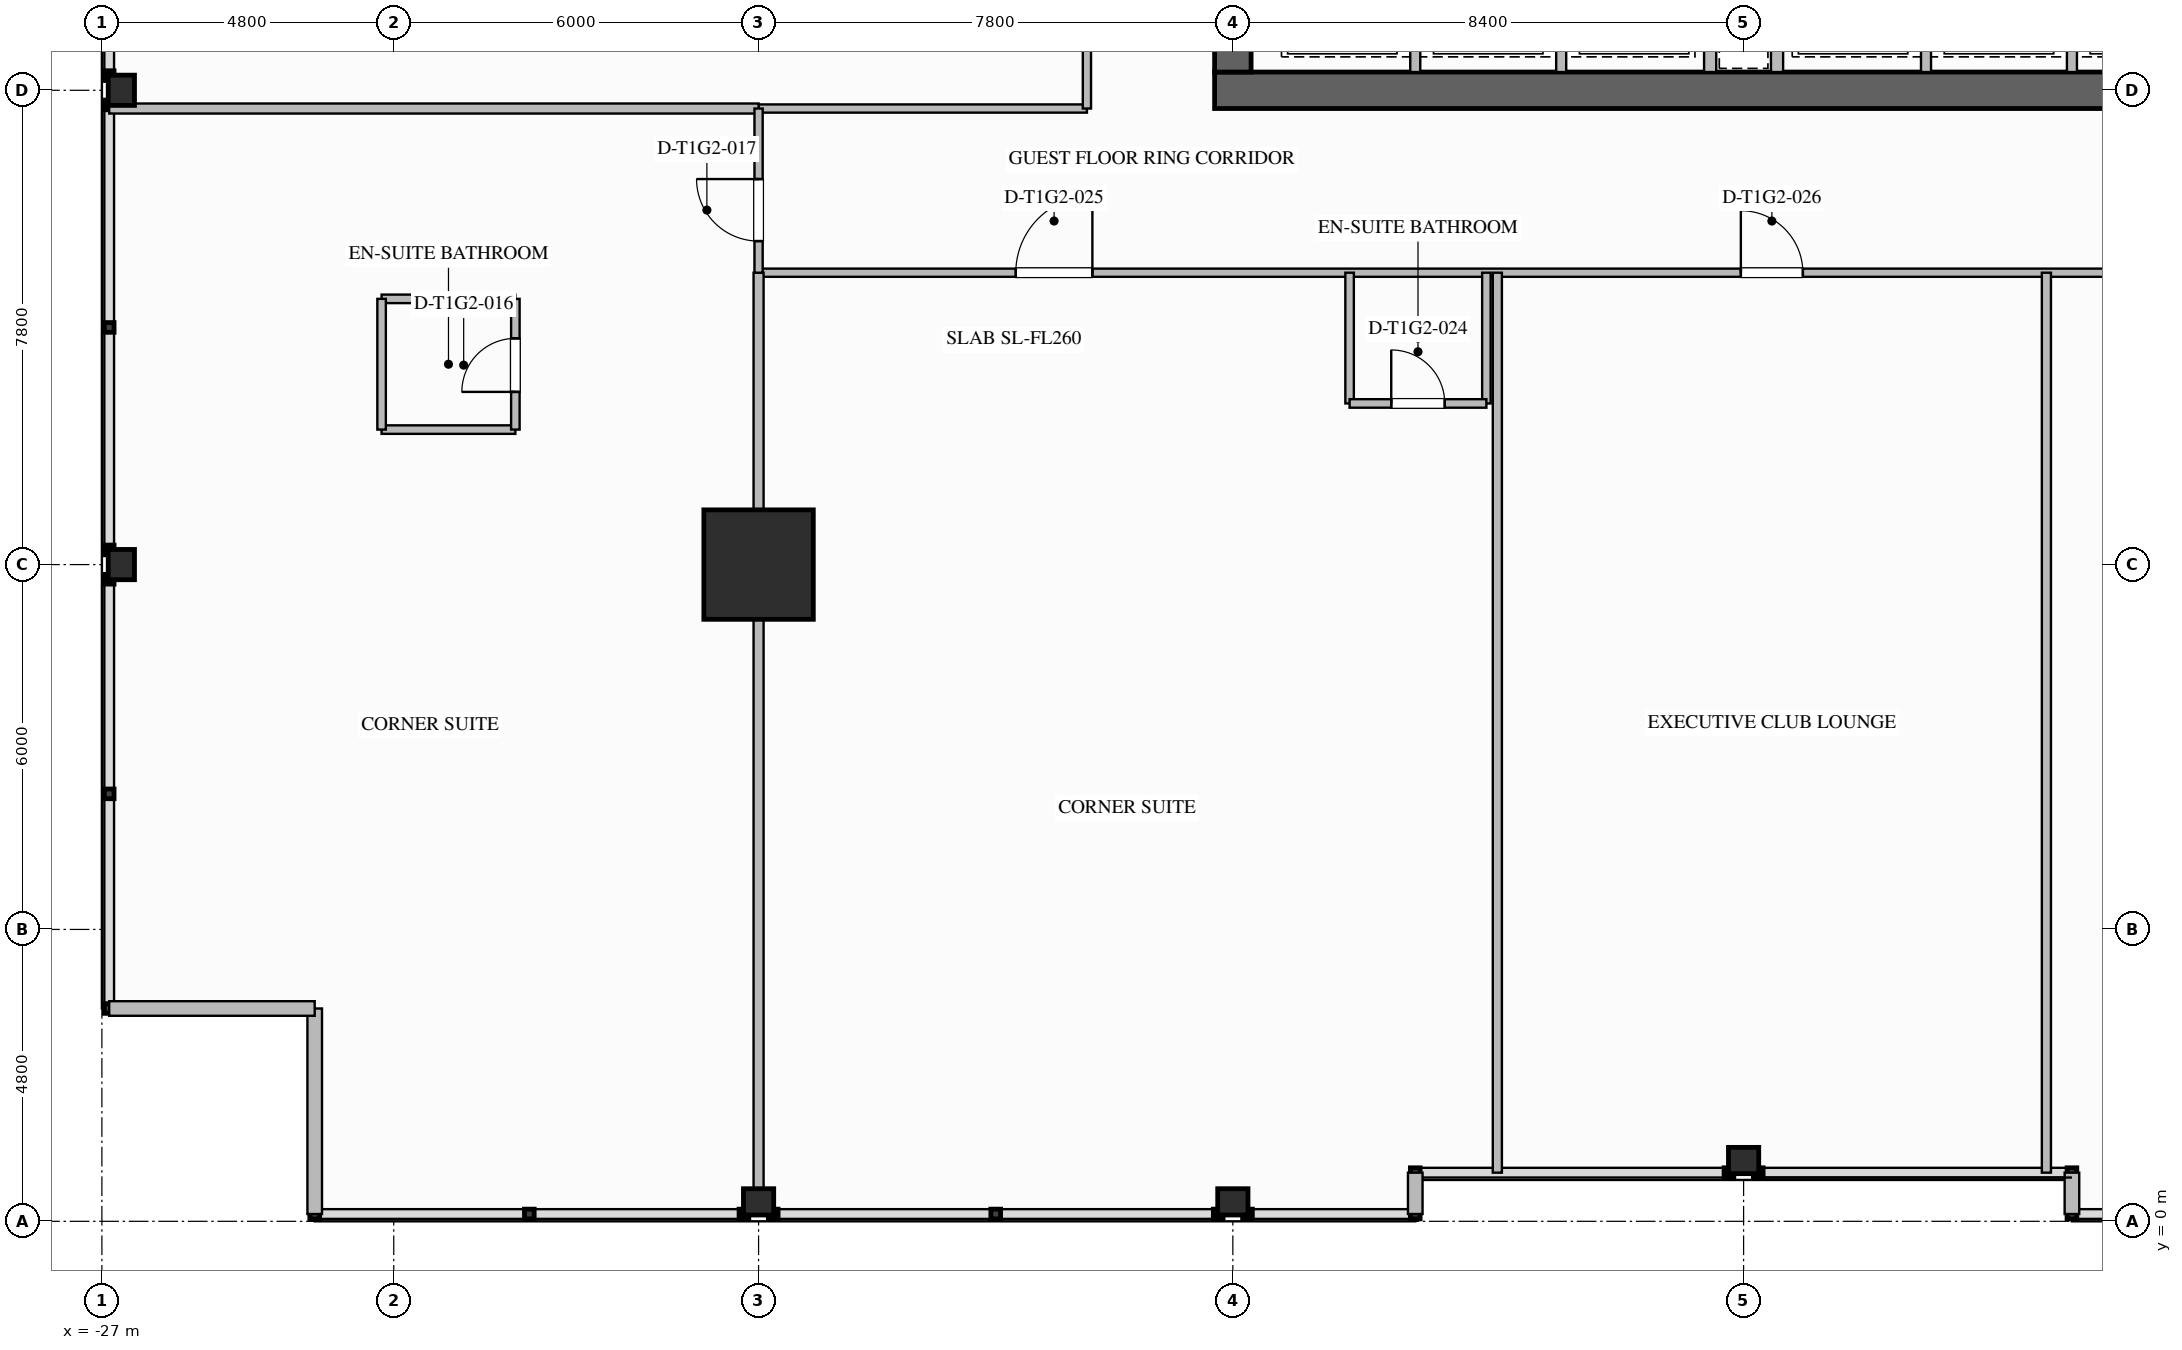
"""IFC4 building model, lengths in metres.
Left out: names, types, materials, properties, quantities, classifications, styles, units other than length and angle.
Written with IfcOpenShell. Run it as: python <this file> out.ifc"""

import sys

from ifc_helpers import new_model, si_unit, direction, frame, frame_2d, origin, origin_2d, place, context, subcontext, project, spatial, rectangle, i_section, extrude, element, fill, save


model = new_model("IFC4")
c1 = context("Model", 3, precision=1e-05, world=origin(), true_north=direction((0.0, 1.0)))
c2 = subcontext(c1, "Body", "Model", "MODEL_VIEW")
j1 = project(units=[si_unit("LENGTHUNIT", "METRE"), si_unit("PLANEANGLEUNIT", "RADIAN")], contexts=[c1])
p1 = place(None, origin())
s1 = spatial("IfcSite", under=j1, at=p1, CompositionType="ELEMENT")
p2 = place(p1, origin())
s2 = spatial("IfcBuilding", under=s1, at=p2, CompositionType="ELEMENT")
p3 = place(p2, frame((0.0, 0.0, 43.7)))
s3 = spatial("IfcBuildingStorey", under=s2, at=p3, CompositionType="ELEMENT", Elevation=43.7)
p4 = place(p3, frame((8.7, 18.6, 0.0), z_axis=(0.0, 0.0, 1.0), x_axis=(-1.0, 0.0, 0.0)))
e1 = element("IfcWall", 1, at=p4, inside=s3, PredefinedType="SHEAR", context=c2, shape_type="SweptSolid", body=[
    extrude(rectangle(XDim=17.4, YDim=0.6, at=frame_2d((8.7, 0.0))), origin(), (0.0, 0.0, 1.0), 3.5),
])
p5 = place(p3, frame((-8.4, 18.9, 0.0), z_axis=(0.0, 0.0, 1.0), x_axis=(0.0, 1.0, 0.0)))
e2 = element("IfcWall", 2, at=p5, inside=s3, PredefinedType="SHEAR", context=c2, shape_type="SweptSolid", body=[
    extrude(rectangle(XDim=16.2, YDim=0.6, at=frame_2d((8.1, 0.0))), origin(), (0.0, 0.0, 1.0), 3.5),
])
p6 = place(p5, frame((3.9, 0.0, 0.0)))
e3 = element("IfcOpeningElement", 3, at=p6, cuts=e2, PredefinedType="OPENING", context=c2, shape_type="SweptSolid", body=[
    extrude(rectangle(XDim=1.08, YDim=2.04, at=frame_2d((0.54, 1.02))), frame((0.0, 0.31, 0.0), z_axis=(0.0, -1.0, 0.0), x_axis=(1.0, 0.0, 0.0)), (0.0, 0.0, 1.0), 0.62),
])
p7 = place(p3, frame((-16.2, 10.8, 0.0), z_axis=(0.0, 0.0, 1.0), x_axis=(1.0, 0.0, 0.0)))
e4 = element("IfcColumn", 4, at=p7, inside=s3, PredefinedType="COLUMN", context=c2, shape_type="SweptSolid", body=[
    extrude(rectangle(XDim=1.8, YDim=1.8, at=origin_2d()), origin(), (0.0, 0.0, 1.0), 3.5),
])
for number, where, z_axis, x_axis in (
    (5, (-26.68, 10.8, 0.0), (0.0, 0.0, 1.0), (1.0, 0.0, 0.0)),
    (6, (-26.68, 18.6, 0.0), (0.0, 0.0, 1.0), (1.0, 0.0, 0.0)),
    (7, (-16.2, 0.32, 0.0), (0.0, 0.0, 1.0), (0.0, 1.0, 0.0)),
    (8, (-8.4, 0.32, 0.0), (0.0, 0.0, 1.0), (0.0, 1.0, 0.0)),
    (9, (0.0, 1.0, 0.0), (0.0, 0.0, 1.0), (0.0, 1.0, 0.0)),
):
    element("IfcColumn", number, at=place(p3, frame(where, z_axis=z_axis, x_axis=x_axis)), inside=s3, PredefinedType="COLUMN", context=c2, shape_type="SweptSolid", body=[
        extrude(i_section(OverallWidth=0.432, OverallDepth=0.498, WebThickness=0.056, FlangeThickness=0.089, FilletRadius=0.03, at=origin_2d()), origin(), (0.0, 0.0, 1.0), 3.497),
    ])
for number, where, z_axis, x_axis in (
    (10, (-23.5, 0.12, 0.0), (0.0, 0.0, 1.0), (0.0, 1.0, 0.0)),
    (11, (-23.5, 3.5, 0.0), (0.0, 0.0, 1.0), (-1.0, 0.0, 0.0)),
):
    element("IfcWall", number, at=place(p3, frame(where, z_axis=z_axis, x_axis=x_axis)), inside=s3, PredefinedType="STANDARD", context=c2, shape_type="SweptSolid", body=[
        extrude(rectangle(XDim=3.38, YDim=0.24, at=frame_2d((1.69, 0.0))), origin(), (0.0, 0.0, 1.0), 3.24),
    ])
for number, where, z_axis, x_axis in (
    (12, (5.4, 0.12, 0.0), (0.0, 0.0, 1.0), (0.0, 1.0, 0.0)),
    (13, (-5.4, 0.8, 0.0), (0.0, 0.0, 1.0), (0.0, -1.0, 0.0)),
):
    element("IfcWall", number, at=place(p3, frame(where, z_axis=z_axis, x_axis=x_axis)), inside=s3, PredefinedType="STANDARD", context=c2, shape_type="SweptSolid", body=[
        extrude(rectangle(XDim=0.68, YDim=0.24, at=frame_2d((0.34, 0.0))), origin(), (0.0, 0.0, 1.0), 3.24),
    ])
for number, where, z_axis, x_axis in (
    (14, (-5.4, 18.9, 0.0), (0.0, 0.0, 1.0), (0.0, 1.0, 0.0)),
    (15, (-3.0, 18.9, 0.0), (0.0, 0.0, 1.0), (0.0, 1.0, 0.0)),
):
    element("IfcWall", number, at=place(p3, frame(where, z_axis=z_axis, x_axis=x_axis)), inside=s3, PredefinedType="PARTITIONING", context=c2, shape_type="SweptSolid", body=[
        extrude(rectangle(XDim=2.88, YDim=0.165, at=frame_2d((1.44, 0.0))), origin(), (0.0, 0.0, 1.0), 3.24),
    ])
for number, where, z_axis, x_axis in (
    (16, (-0.55, 18.9, 0.0), (0.0, 0.0, 1.0), (0.0, 1.0, 0.0)),
    (17, (0.55, 18.9, 0.0), (0.0, 0.0, 1.0), (0.0, 1.0, 0.0)),
):
    element("IfcWall", number, at=place(p3, frame(where, z_axis=z_axis, x_axis=x_axis)), inside=s3, PredefinedType="SOLIDWALL", context=c2, shape_type="SweptSolid", body=[
        extrude(rectangle(XDim=2.88, YDim=0.2, at=frame_2d((1.44, 0.0))), origin(), (0.0, 0.0, 1.0), 3.24),
    ])
for number, where, z_axis, x_axis in (
    (18, (3.0, 18.9, 0.0), (0.0, 0.0, 1.0), (0.0, 1.0, 0.0)),
    (19, (5.4, 18.9, 0.0), (0.0, 0.0, 1.0), (0.0, 1.0, 0.0)),
):
    element("IfcWall", number, at=place(p3, frame(where, z_axis=z_axis, x_axis=x_axis)), inside=s3, PredefinedType="PARTITIONING", context=c2, shape_type="SweptSolid", body=[
        extrude(rectangle(XDim=2.88, YDim=0.165, at=frame_2d((1.44, 0.0))), origin(), (0.0, 0.0, 1.0), 3.24),
    ])
p8 = place(p3, frame((-16.2, 15.6, 0.0), z_axis=(0.0, 0.0, 1.0), x_axis=(1.0, 0.0, 0.0)))
e20 = element("IfcWall", 20, at=p8, inside=s3, PredefinedType="PARTITIONING", context=c2, shape_type="SweptSolid", body=[
    extrude(rectangle(XDim=32.4, YDim=0.135, at=frame_2d((16.2, 0.0))), origin(), (0.0, 0.0, 1.0), 3.24),
])
p9 = place(p8, frame((4.23, 0.0, 0.0)))
e21 = element("IfcOpeningElement", 21, at=p9, cuts=e20, PredefinedType="OPENING", context=c2, shape_type="SweptSolid", body=[
    extrude(rectangle(XDim=1.26, YDim=2.2, at=frame_2d((0.63, 1.1))), frame((0.0, 0.077, 0.0), z_axis=(0.0, -1.0, 0.0), x_axis=(1.0, 0.0, 0.0)), (0.0, 0.0, 1.0), 0.155),
])
p10 = place(p8, frame((16.155, 0.0, 0.0)))
e22 = element("IfcOpeningElement", 22, at=p10, cuts=e20, PredefinedType="OPENING", context=c2, shape_type="SweptSolid", body=[
    extrude(rectangle(XDim=1.02, YDim=2.15, at=frame_2d((0.51, 1.075))), frame((0.0, 0.077, 0.0), z_axis=(0.0, -1.0, 0.0), x_axis=(1.0, 0.0, 0.0)), (0.0, 0.0, 1.0), 0.155),
])
p11 = place(p8, frame((24.945, 0.0, 0.0)))
e23 = element("IfcOpeningElement", 23, at=p11, cuts=e20, PredefinedType="OPENING", context=c2, shape_type="SweptSolid", body=[
    extrude(rectangle(XDim=1.26, YDim=2.2, at=frame_2d((0.63, 1.1))), frame((0.0, 0.077, 0.0), z_axis=(0.0, -1.0, 0.0), x_axis=(1.0, 0.0, 0.0)), (0.0, 0.0, 1.0), 0.155),
])
p12 = place(p3, frame((-16.2, 18.3, 0.0), z_axis=(0.0, 0.0, 1.0), x_axis=(1.0, 0.0, 0.0)))
e24 = element("IfcWall", 24, at=p12, inside=s3, PredefinedType="PARTITIONING", context=c2, shape_type="SweptSolid", body=[
    extrude(rectangle(XDim=5.4, YDim=0.135, at=frame_2d((2.7, 0.0))), origin(), (0.0, 0.0, 1.0), 3.24),
])
p13 = place(p3, frame((-10.8, 18.3, 0.0), z_axis=(0.0, 0.0, 1.0), x_axis=(0.0, 1.0, 0.0)))
e25 = element("IfcWall", 25, at=p13, inside=s3, PredefinedType="PARTITIONING", context=c2, shape_type="SweptSolid", body=[
    extrude(rectangle(XDim=17.4, YDim=0.135, at=frame_2d((8.7, 0.0))), origin(), (0.0, 0.0, 1.0), 3.24),
])
p14 = place(p13, frame((2.795, 0.0, 0.0)))
e26 = element("IfcOpeningElement", 26, at=p14, cuts=e25, PredefinedType="OPENING", context=c2, shape_type="SweptSolid", body=[
    extrude(rectangle(XDim=1.26, YDim=2.2, at=frame_2d((0.63, 1.1))), frame((0.0, 0.077, 0.0), z_axis=(0.0, -1.0, 0.0), x_axis=(1.0, 0.0, 0.0)), (0.0, 0.0, 1.0), 0.155),
])
p15 = place(p13, frame((12.83, 0.0, 0.0)))
e27 = element("IfcOpeningElement", 27, at=p15, cuts=e25, PredefinedType="OPENING", context=c2, shape_type="SweptSolid", body=[
    extrude(rectangle(XDim=1.02, YDim=2.15, at=frame_2d((0.51, 1.075))), frame((0.0, 0.077, 0.0), z_axis=(0.0, -1.0, 0.0), x_axis=(1.0, 0.0, 0.0)), (0.0, 0.0, 1.0), 0.155),
])
p16 = place(p3, frame((-16.2, 0.12, 0.0), z_axis=(0.0, 0.0, 1.0), x_axis=(0.0, 1.0, 0.0)))
e28 = element("IfcWall", 28, at=p16, inside=s3, PredefinedType="PARTITIONING", context=c2, shape_type="SweptSolid", body=[
    extrude(rectangle(XDim=15.48, YDim=0.165, at=frame_2d((7.74, 0.0))), origin(), (0.0, 0.0, 1.0), 2.298),
])
p17 = place(p3, frame((-26.88, 18.3, 0.0), z_axis=(0.0, 0.0, 1.0), x_axis=(1.0, 0.0, 0.0)))
e29 = element("IfcWall", 29, at=p17, inside=s3, PredefinedType="PARTITIONING", context=c2, shape_type="SweptSolid", body=[
    extrude(rectangle(XDim=10.68, YDim=0.165, at=frame_2d((5.34, 0.0))), origin(), (0.0, 0.0, 1.0), 2.298),
])
p18 = place(p3, frame((-16.2, 15.6, 0.0), z_axis=(0.0, 0.0, 1.0), x_axis=(0.0, 1.0, 0.0)))
e30 = element("IfcWall", 30, at=p18, inside=s3, PredefinedType="PARTITIONING", context=c2, shape_type="SweptSolid", body=[
    extrude(rectangle(XDim=2.7, YDim=0.135, at=frame_2d((1.35, 0.0))), origin(), (0.0, 0.0, 1.0), 2.298),
])
p19 = place(p18, frame((0.52, 0.0, 0.0)))
e31 = element("IfcOpeningElement", 31, at=p19, cuts=e30, PredefinedType="OPENING", context=c2, shape_type="SweptSolid", body=[
    extrude(rectangle(XDim=1.02, YDim=2.15, at=frame_2d((0.51, 1.075))), frame((0.0, 0.077, 0.0), z_axis=(0.0, -1.0, 0.0), x_axis=(1.0, 0.0, 0.0)), (0.0, 0.0, 1.0), 0.155),
])
for number, where, z_axis, x_axis in (
    (32, (-22.4, 13.02, 0.0), (0.0, 0.0, 1.0), (1.0, 0.0, 0.0)),
    (33, (-22.4, 15.17, 0.0), (0.0, 0.0, 1.0), (1.0, 0.0, 0.0)),
):
    element("IfcWall", number, at=place(p3, frame(where, z_axis=z_axis, x_axis=x_axis)), inside=s3, PredefinedType="PLUMBINGWALL", context=c2, shape_type="SweptSolid", body=[
        extrude(rectangle(XDim=2.2, YDim=0.14, at=frame_2d((1.1, 0.0))), origin(), (0.0, 0.0, 1.0), 3.24),
    ])
p20 = place(p3, frame((-22.4, 13.02, 0.0), z_axis=(0.0, 0.0, 1.0), x_axis=(0.0, 1.0, 0.0)))
e34 = element("IfcWall", 34, at=p20, inside=s3, PredefinedType="PLUMBINGWALL", context=c2, shape_type="SweptSolid", body=[
    extrude(rectangle(XDim=2.15, YDim=0.14, at=frame_2d((1.075, 0.0))), origin(), (0.0, 0.0, 1.0), 3.24),
])
p21 = place(p3, frame((-20.2, 13.02, 0.0), z_axis=(0.0, 0.0, 1.0), x_axis=(0.0, 1.0, 0.0)))
e35 = element("IfcWall", 35, at=p21, inside=s3, PredefinedType="PLUMBINGWALL", context=c2, shape_type="SweptSolid", body=[
    extrude(rectangle(XDim=2.15, YDim=0.14, at=frame_2d((1.075, 0.0))), origin(), (0.0, 0.0, 1.0), 3.24),
])
p22 = place(p21, frame((0.62, 0.0, 0.0)))
e36 = element("IfcOpeningElement", 36, at=p22, cuts=e35, PredefinedType="OPENING", context=c2, shape_type="SweptSolid", body=[
    extrude(rectangle(XDim=0.88, YDim=2.1, at=frame_2d((0.44, 1.05))), frame((0.0, 0.08, 0.0), z_axis=(0.0, -1.0, 0.0), x_axis=(1.0, 0.0, 0.0)), (0.0, 0.0, 1.0), 0.16),
])
for number, where, z_axis, x_axis in (
    (37, (-6.48, 15.6, 0.0), (0.0, 0.0, 1.0), (0.0, -1.0, 0.0)),
    (38, (-4.23, 15.6, 0.0), (0.0, 0.0, 1.0), (0.0, -1.0, 0.0)),
):
    element("IfcWall", number, at=place(p3, frame(where, z_axis=z_axis, x_axis=x_axis)), inside=s3, PredefinedType="PLUMBINGWALL", context=c2, shape_type="SweptSolid", body=[
        extrude(rectangle(XDim=2.15, YDim=0.14, at=frame_2d((1.075, 0.0))), origin(), (0.0, 0.0, 1.0), 3.24),
    ])
p23 = place(p3, frame((-6.48, 13.45, 0.0), z_axis=(0.0, 0.0, 1.0), x_axis=(1.0, 0.0, 0.0)))
e39 = element("IfcWall", 39, at=p23, inside=s3, PredefinedType="PLUMBINGWALL", context=c2, shape_type="SweptSolid", body=[
    extrude(rectangle(XDim=2.25, YDim=0.14, at=frame_2d((1.125, 0.0))), origin(), (0.0, 0.0, 1.0), 3.24),
])
p24 = place(p23, frame((0.685, 0.0, 0.0)))
e40 = element("IfcOpeningElement", 40, at=p24, cuts=e39, PredefinedType="OPENING", context=c2, shape_type="SweptSolid", body=[
    extrude(rectangle(XDim=0.88, YDim=2.1, at=frame_2d((0.44, 1.05))), frame((0.0, 0.08, 0.0), z_axis=(0.0, -1.0, 0.0), x_axis=(1.0, 0.0, 0.0)), (0.0, 0.0, 1.0), 0.16),
])
for number, where, z_axis, x_axis in (
    (41, (-4.05, 0.8, 0.0), (0.0, 0.0, 1.0), (0.0, 1.0, 0.0)),
    (42, (4.98, 0.8, 0.0), (0.0, 0.0, 1.0), (0.0, 1.0, 0.0)),
):
    element("IfcWall", number, at=place(p3, frame(where, z_axis=z_axis, x_axis=x_axis)), inside=s3, PredefinedType="PARTITIONING", context=c2, shape_type="SweptSolid", body=[
        extrude(rectangle(XDim=14.8, YDim=0.15, at=frame_2d((7.4, 0.0))), origin(), (0.0, 0.0, 1.0), 3.24),
    ])
p25 = place(p22, origin())
e43 = element("IfcDoor", 43, at=p25, inside=s3, OperationType="SINGLE_SWING_LEFT", PredefinedType="DOOR", context=c2, shape_type="SweptSolid", body=[
    extrude(rectangle(XDim=0.88, YDim=2.1, at=frame_2d((0.44, 1.05))), frame((0.0, 0.025, 0.0), z_axis=(0.0, -1.0, 0.0), x_axis=(1.0, 0.0, 0.0)), (0.0, 0.0, 1.0), 0.05),
])
fill(e36, e43)
p26 = place(p19, origin())
e44 = element("IfcDoor", 44, at=p26, inside=s3, OperationType="SINGLE_SWING_RIGHT", PredefinedType="DOOR", context=c2, shape_type="SweptSolid", body=[
    extrude(rectangle(XDim=1.02, YDim=2.15, at=frame_2d((0.51, 1.075))), frame((0.0, 0.025, 0.0), z_axis=(0.0, -1.0, 0.0), x_axis=(1.0, 0.0, 0.0)), (0.0, 0.0, 1.0), 0.05),
])
fill(e31, e44)
p27 = place(p24, origin())
e45 = element("IfcDoor", 45, at=p27, inside=s3, OperationType="SINGLE_SWING_LEFT", PredefinedType="DOOR", context=c2, shape_type="SweptSolid", body=[
    extrude(rectangle(XDim=0.88, YDim=2.1, at=frame_2d((0.44, 1.05))), frame((0.0, 0.025, 0.0), z_axis=(0.0, -1.0, 0.0), x_axis=(1.0, 0.0, 0.0)), (0.0, 0.0, 1.0), 0.05),
])
fill(e40, e45)
p28 = place(p9, origin())
e46 = element("IfcDoor", 46, at=p28, inside=s3, OperationType="SINGLE_SWING_RIGHT", PredefinedType="DOOR", context=c2, shape_type="SweptSolid", body=[
    extrude(rectangle(XDim=1.26, YDim=2.2, at=frame_2d((0.63, 1.1))), frame((0.0, 0.025, 0.0), z_axis=(0.0, -1.0, 0.0), x_axis=(1.0, 0.0, 0.0)), (0.0, 0.0, 1.0), 0.05),
])
fill(e21, e46)
p29 = place(p10, origin())
e47 = element("IfcDoor", 47, at=p29, inside=s3, OperationType="SINGLE_SWING_LEFT", PredefinedType="DOOR", context=c2, shape_type="SweptSolid", body=[
    extrude(rectangle(XDim=1.02, YDim=2.15, at=frame_2d((0.51, 1.075))), frame((0.0, 0.025, 0.0), z_axis=(0.0, -1.0, 0.0), x_axis=(1.0, 0.0, 0.0)), (0.0, 0.0, 1.0), 0.05),
])
fill(e22, e47)
save(model, sys.argv[1])
